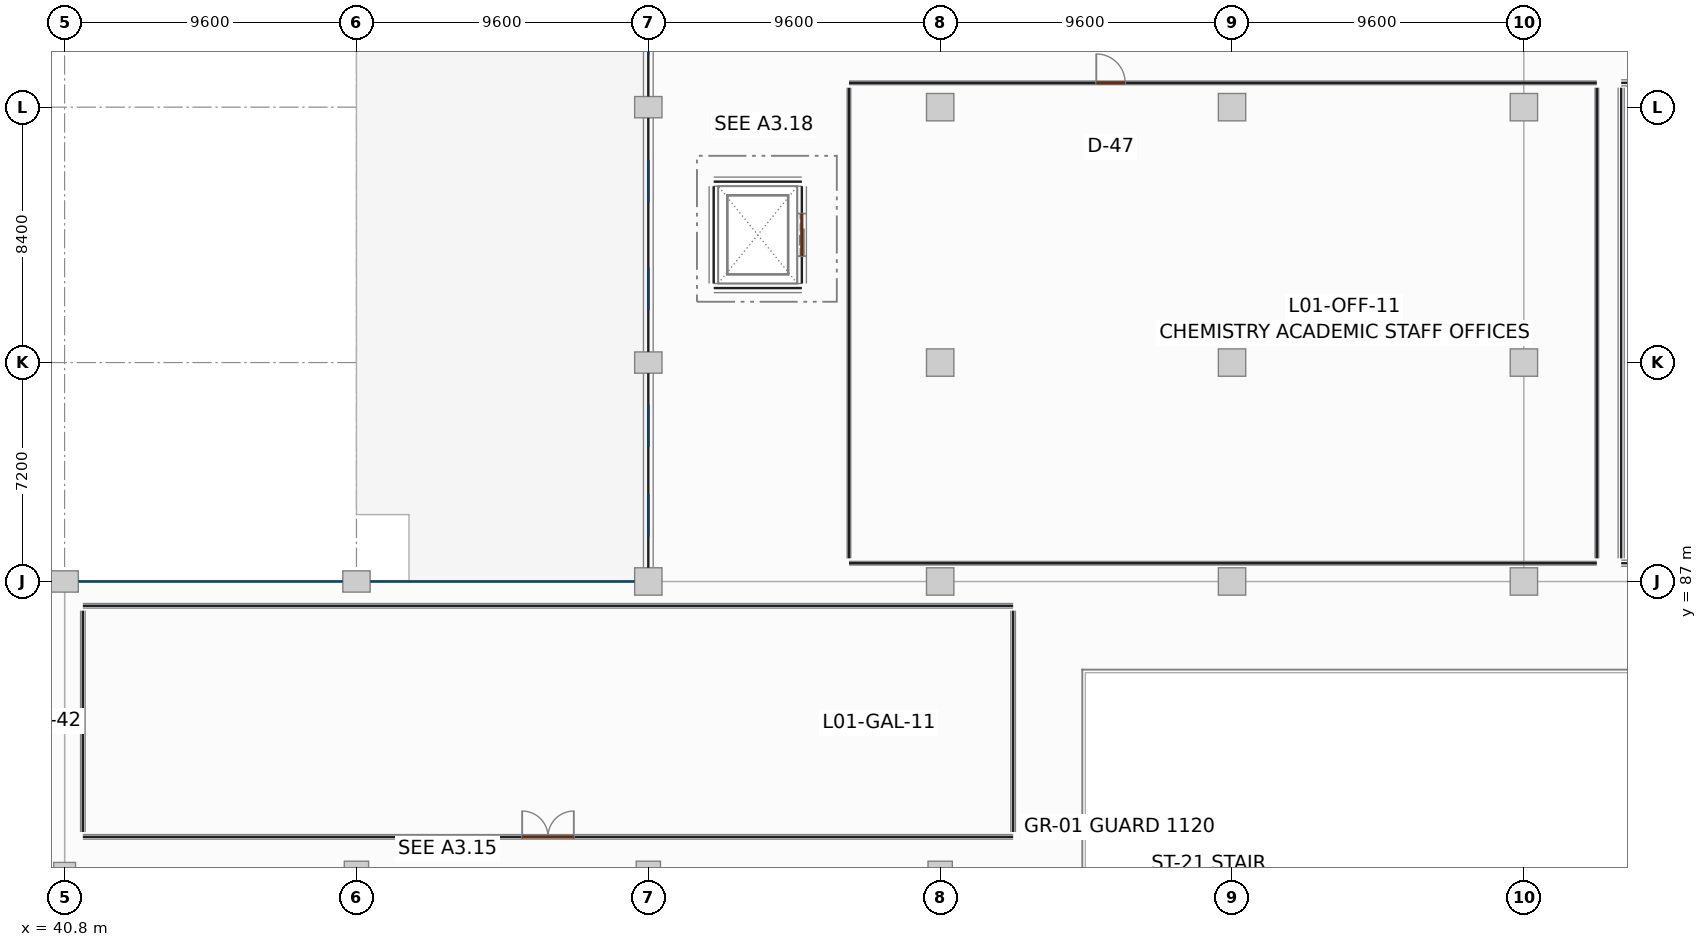
"""IFC4 building model, lengths in metres.
Left out: names, types, materials, properties, quantities, classifications, styles, units other than length and angle.
Written with IfcOpenShell. Run it as: python <this file> out.ifc"""

import sys

from ifc_helpers import new_model, si_unit, direction, frame, frame_2d, origin, origin_2d, place, context, subcontext, project, spatial, rectangle, extrude, element, fill, save


model = new_model("IFC4")
c1 = context("Model", 3, precision=1e-05, world=origin(), true_north=direction((0.0, 1.0)))
c2 = subcontext(c1, "Body", "Model", "MODEL_VIEW")
j1 = project(units=[si_unit("LENGTHUNIT", "METRE"), si_unit("PLANEANGLEUNIT", "RADIAN")], contexts=[c1])
p1 = place(None, origin())
s1 = spatial("IfcSite", under=j1, at=p1, CompositionType="ELEMENT")
p2 = place(p1, origin())
s2 = spatial("IfcBuilding", under=s1, at=p2, CompositionType="ELEMENT")
p3 = place(p2, frame((0.0, 0.0, 5.4)))
s3 = spatial("IfcBuildingStorey", under=s2, at=p3, CompositionType="ELEMENT", Elevation=5.4)
p4 = place(p3, frame((40.8, 77.4, 0.0), z_axis=(0.0, 0.0, 1.0), x_axis=(1.0, 0.0, 0.0)))
e1 = element("IfcColumn", 1, at=p4, inside=s3, PredefinedType="COLUMN", context=c2, shape_type="SweptSolid", body=[
    extrude(rectangle(XDim=0.72, YDim=0.72, at=origin_2d()), origin(), (0.0, 0.0, 1.0), 4.18),
])
p5 = place(p3, frame((40.8, 87.0, 0.0), z_axis=(0.0, 0.0, 1.0), x_axis=(1.0, 0.0, 0.0)))
e2 = element("IfcColumn", 2, at=p5, inside=s3, PredefinedType="COLUMN", context=c2, shape_type="SweptSolid", body=[
    extrude(rectangle(XDim=0.9, YDim=0.7, at=origin_2d()), origin(), (0.0, 0.0, 1.0), 4.18),
])
p6 = place(p3, frame((50.4, 77.4, 0.0), z_axis=(0.0, 0.0, 1.0), x_axis=(1.0, 0.0, 0.0)))
e3 = element("IfcColumn", 3, at=p6, inside=s3, PredefinedType="COLUMN", context=c2, shape_type="SweptSolid", body=[
    extrude(rectangle(XDim=0.8, YDim=0.8, at=origin_2d()), origin(), (0.0, 0.0, 1.0), 4.18),
])
p7 = place(p3, frame((50.4, 87.0, 0.0), z_axis=(0.0, 0.0, 1.0), x_axis=(1.0, 0.0, 0.0)))
e4 = element("IfcColumn", 4, at=p7, inside=s3, PredefinedType="COLUMN", context=c2, shape_type="SweptSolid", body=[
    extrude(rectangle(XDim=0.9, YDim=0.7, at=origin_2d()), origin(), (0.0, 0.0, 1.0), 4.18),
])
p8 = place(p3, frame((60.0, 77.4, 0.0), z_axis=(0.0, 0.0, 1.0), x_axis=(1.0, 0.0, 0.0)))
e5 = element("IfcColumn", 5, at=p8, inside=s3, PredefinedType="COLUMN", context=c2, shape_type="SweptSolid", body=[
    extrude(rectangle(XDim=0.8, YDim=0.8, at=origin_2d()), origin(), (0.0, 0.0, 1.0), 4.18),
])
p9 = place(p3, frame((60.0, 87.0, 0.0), z_axis=(0.0, 0.0, 1.0), x_axis=(1.0, 0.0, 0.0)))
e6 = element("IfcColumn", 6, at=p9, inside=s3, PredefinedType="COLUMN", context=c2, shape_type="SweptSolid", body=[
    extrude(rectangle(XDim=0.9, YDim=0.9, at=origin_2d()), origin(), (0.0, 0.0, 1.0), 4.18),
])
for number, where, z_axis, x_axis in (
    (7, (60.0, 94.2, 0.0), (0.0, 0.0, 1.0), (1.0, 0.0, 0.0)),
    (8, (60.0, 102.6, 0.0), (0.0, 0.0, 1.0), (1.0, 0.0, 0.0)),
):
    element("IfcColumn", number, at=place(p3, frame(where, z_axis=z_axis, x_axis=x_axis)), inside=s3, PredefinedType="COLUMN", context=c2, shape_type="SweptSolid", body=[
        extrude(rectangle(XDim=0.9, YDim=0.7, at=origin_2d()), origin(), (0.0, 0.0, 1.0), 4.18),
    ])
p10 = place(p3, frame((69.6, 77.4, 0.0), z_axis=(0.0, 0.0, 1.0), x_axis=(1.0, 0.0, 0.0)))
e9 = element("IfcColumn", 9, at=p10, inside=s3, PredefinedType="COLUMN", context=c2, shape_type="SweptSolid", body=[
    extrude(rectangle(XDim=0.8, YDim=0.8, at=origin_2d()), origin(), (0.0, 0.0, 1.0), 4.18),
])
for number, where, z_axis, x_axis in (
    (10, (69.6, 87.0, 0.0), (0.0, 0.0, 1.0), (1.0, 0.0, 0.0)),
    (11, (69.6, 94.2, 0.0), (0.0, 0.0, 1.0), (1.0, 0.0, 0.0)),
    (12, (69.6, 102.6, 0.0), (0.0, 0.0, 1.0), (1.0, 0.0, 0.0)),
    (13, (79.2, 87.0, 0.0), (0.0, 0.0, 1.0), (1.0, 0.0, 0.0)),
    (14, (79.2, 94.2, 0.0), (0.0, 0.0, 1.0), (1.0, 0.0, 0.0)),
    (15, (79.2, 102.6, 0.0), (0.0, 0.0, 1.0), (1.0, 0.0, 0.0)),
    (16, (88.8, 87.0, 0.0), (0.0, 0.0, 1.0), (1.0, 0.0, 0.0)),
    (17, (88.8, 94.2, 0.0), (0.0, 0.0, 1.0), (1.0, 0.0, 0.0)),
    (18, (88.8, 102.6, 0.0), (0.0, 0.0, 1.0), (1.0, 0.0, 0.0)),
):
    element("IfcColumn", number, at=place(p3, frame(where, z_axis=z_axis, x_axis=x_axis)), inside=s3, PredefinedType="COLUMN", context=c2, shape_type="SweptSolid", body=[
        extrude(rectangle(XDim=0.9, YDim=0.9, at=origin_2d()), origin(), (0.0, 0.0, 1.0), 4.18),
    ])
p11 = place(p3, frame((60.0, 87.452, 0.0), z_axis=(0.0, 0.0, 1.0), x_axis=(0.0, 1.0, 0.0)))
e19 = element("IfcWall", 19, at=p11, inside=s3, PredefinedType="SOLIDWALL", context=c2, shape_type="SweptSolid", body=[
    extrude(rectangle(XDim=6.396, YDim=0.32, at=frame_2d((3.198, 0.0))), origin(), (0.0, 0.0, 1.0), 3.38),
])
p12 = place(p11, frame((1.027, 0.0, 0.85)))
e20 = element("IfcOpeningElement", 20, at=p12, cuts=e19, PredefinedType="OPENING", context=c2, shape_type="SweptSolid", body=[
    extrude(rectangle(XDim=1.4, YDim=1.65, at=frame_2d((0.7, 0.825))), frame((0.0, 0.17, 0.0), z_axis=(0.0, -1.0, 0.0), x_axis=(1.0, 0.0, 0.0)), (0.0, 0.0, 1.0), 0.34),
])
p13 = place(p11, frame((3.969, 0.0, 0.85)))
e21 = element("IfcOpeningElement", 21, at=p13, cuts=e19, PredefinedType="OPENING", context=c2, shape_type="SweptSolid", body=[
    extrude(rectangle(XDim=1.4, YDim=1.65, at=frame_2d((0.7, 0.825))), frame((0.0, 0.17, 0.0), z_axis=(0.0, -1.0, 0.0), x_axis=(1.0, 0.0, 0.0)), (0.0, 0.0, 1.0), 0.34),
])
p14 = place(p3, frame((60.0, 94.552, 0.0), z_axis=(0.0, 0.0, 1.0), x_axis=(0.0, 1.0, 0.0)))
e22 = element("IfcWall", 22, at=p14, inside=s3, PredefinedType="SOLIDWALL", context=c2, shape_type="SweptSolid", body=[
    extrude(rectangle(XDim=7.696, YDim=0.32, at=frame_2d((3.848, 0.0))), origin(), (0.0, 0.0, 1.0), 3.38),
])
p15 = place(p14, frame((1.378, 0.0, 0.85)))
e23 = element("IfcOpeningElement", 23, at=p15, cuts=e22, PredefinedType="OPENING", context=c2, shape_type="SweptSolid", body=[
    extrude(rectangle(XDim=1.4, YDim=1.65, at=frame_2d((0.7, 0.825))), frame((0.0, 0.17, 0.0), z_axis=(0.0, -1.0, 0.0), x_axis=(1.0, 0.0, 0.0)), (0.0, 0.0, 1.0), 0.34),
])
p16 = place(p14, frame((4.918, 0.0, 0.85)))
e24 = element("IfcOpeningElement", 24, at=p16, cuts=e22, PredefinedType="OPENING", context=c2, shape_type="SweptSolid", body=[
    extrude(rectangle(XDim=1.4, YDim=1.65, at=frame_2d((0.7, 0.825))), frame((0.0, 0.17, 0.0), z_axis=(0.0, -1.0, 0.0), x_axis=(1.0, 0.0, 0.0)), (0.0, 0.0, 1.0), 0.34),
])
p17 = place(p3, frame((60.0, 102.952, 0.0), z_axis=(0.0, 0.0, 1.0), x_axis=(0.0, 1.0, 0.0)))
e25 = element("IfcWall", 25, at=p17, inside=s3, PredefinedType="SOLIDWALL", context=c2, shape_type="SweptSolid", body=[
    extrude(rectangle(XDim=7.696, YDim=0.32, at=frame_2d((3.848, 0.0))), origin(), (0.0, 0.0, 1.0), 3.38),
])
p18 = place(p17, frame((1.378, 0.0, 0.85)))
e26 = element("IfcOpeningElement", 26, at=p18, cuts=e25, PredefinedType="OPENING", context=c2, shape_type="SweptSolid", body=[
    extrude(rectangle(XDim=1.4, YDim=1.65, at=frame_2d((0.7, 0.825))), frame((0.0, 0.17, 0.0), z_axis=(0.0, -1.0, 0.0), x_axis=(1.0, 0.0, 0.0)), (0.0, 0.0, 1.0), 0.34),
])
p19 = place(p17, frame((4.918, 0.0, 0.85)))
e27 = element("IfcOpeningElement", 27, at=p19, cuts=e25, PredefinedType="OPENING", context=c2, shape_type="SweptSolid", body=[
    extrude(rectangle(XDim=1.4, YDim=1.65, at=frame_2d((0.7, 0.825))), frame((0.0, 0.17, 0.0), z_axis=(0.0, -1.0, 0.0), x_axis=(1.0, 0.0, 0.0)), (0.0, 0.0, 1.0), 0.34),
])
for number, where, z_axis, x_axis in (
    (28, (62.15, 96.65, 0.0), (0.0, 0.0, 1.0), (1.0, 0.0, 0.0)),
    (29, (62.15, 100.15, 0.0), (0.0, 0.0, 1.0), (1.0, 0.0, 0.0)),
):
    element("IfcWall", number, at=place(p3, frame(where, z_axis=z_axis, x_axis=x_axis)), inside=s3, PredefinedType="SHEAR", context=c2, shape_type="SweptSolid", body=[
        extrude(rectangle(XDim=2.9, YDim=0.3, at=frame_2d((1.45, 0.0))), origin(), (0.0, 0.0, 1.0), 4.18),
    ])
p20 = place(p3, frame((62.15, 96.8, 0.0), z_axis=(0.0, 0.0, 1.0), x_axis=(0.0, 1.0, 0.0)))
e30 = element("IfcWall", 30, at=p20, inside=s3, PredefinedType="SHEAR", context=c2, shape_type="SweptSolid", body=[
    extrude(rectangle(XDim=3.2, YDim=0.3, at=frame_2d((1.6, 0.0))), origin(), (0.0, 0.0, 1.0), 4.18),
])
p21 = place(p3, frame((65.05, 96.8, 0.0), z_axis=(0.0, 0.0, 1.0), x_axis=(0.0, 1.0, 0.0)))
e31 = element("IfcWall", 31, at=p21, inside=s3, PredefinedType="SHEAR", context=c2, shape_type="SweptSolid", body=[
    extrude(rectangle(XDim=3.2, YDim=0.3, at=frame_2d((1.6, 0.0))), origin(), (0.0, 0.0, 1.0), 4.18),
])
p22 = place(p21, frame((0.9, 0.0, 0.0)))
e32 = element("IfcOpeningElement", 32, at=p22, cuts=e31, PredefinedType="OPENING", context=c2, shape_type="SweptSolid", body=[
    extrude(rectangle(XDim=1.4, YDim=2.3, at=frame_2d((0.7, 1.15))), frame((0.0, 0.16, 0.0), z_axis=(0.0, -1.0, 0.0), x_axis=(1.0, 0.0, 0.0)), (0.0, 0.0, 1.0), 0.32),
])
p23 = place(p3, frame((41.4, 78.6, 0.0), z_axis=(0.0, 0.0, 1.0), x_axis=(1.0, 0.0, 0.0)))
e33 = element("IfcWall", 33, at=p23, inside=s3, PredefinedType="PARTITIONING", context=c2, shape_type="SweptSolid", body=[
    extrude(rectangle(XDim=30.6, YDim=0.15, at=frame_2d((15.3, 0.0))), origin(), (0.0, 0.0, 1.0), 3.22),
])
p24 = place(p23, frame((14.45, 0.0, 0.0)))
e34 = element("IfcOpeningElement", 34, at=p24, cuts=e33, PredefinedType="OPENING", context=c2, shape_type="SweptSolid", body=[
    extrude(rectangle(XDim=1.7, YDim=2.3, at=frame_2d((0.85, 1.15))), frame((0.0, 0.085, 0.0), z_axis=(0.0, -1.0, 0.0), x_axis=(1.0, 0.0, 0.0)), (0.0, 0.0, 1.0), 0.17),
])
p25 = place(p3, frame((41.4, 86.2, 0.0), z_axis=(0.0, 0.0, 1.0), x_axis=(1.0, 0.0, 0.0)))
e35 = element("IfcWall", 35, at=p25, inside=s3, PredefinedType="PARTITIONING", context=c2, shape_type="SweptSolid", body=[
    extrude(rectangle(XDim=30.6, YDim=0.15, at=frame_2d((15.3, 0.0))), origin(), (0.0, 0.0, 1.0), 3.22),
])
for number, where, z_axis, x_axis in (
    (36, (41.4, 78.76, 0.0), (0.0, 0.0, 1.0), (0.0, 1.0, 0.0)),
    (37, (72.0, 78.76, 0.0), (0.0, 0.0, 1.0), (0.0, 1.0, 0.0)),
):
    element("IfcWall", number, at=place(p3, frame(where, z_axis=z_axis, x_axis=x_axis)), inside=s3, PredefinedType="PARTITIONING", context=c2, shape_type="SweptSolid", body=[
        extrude(rectangle(XDim=7.28, YDim=0.15, at=frame_2d((3.64, 0.0))), origin(), (0.0, 0.0, 1.0), 3.22),
    ])
p26 = place(p3, frame((66.6, 87.6, 0.0), z_axis=(0.0, 0.0, 1.0), x_axis=(1.0, 0.0, 0.0)))
e38 = element("IfcWall", 38, at=p26, inside=s3, PredefinedType="PARTITIONING", context=c2, shape_type="SweptSolid", body=[
    extrude(rectangle(XDim=24.6, YDim=0.12, at=frame_2d((12.3, 0.0))), origin(), (0.0, 0.0, 1.0), 3.22),
])
p27 = place(p3, frame((66.6, 103.4, 0.0), z_axis=(0.0, 0.0, 1.0), x_axis=(1.0, 0.0, 0.0)))
e39 = element("IfcWall", 39, at=p27, inside=s3, PredefinedType="PARTITIONING", context=c2, shape_type="SweptSolid", body=[
    extrude(rectangle(XDim=24.6, YDim=0.12, at=frame_2d((12.3, 0.0))), origin(), (0.0, 0.0, 1.0), 3.22),
])
p28 = place(p27, frame((8.135, 0.0, 0.0)))
e40 = element("IfcOpeningElement", 40, at=p28, cuts=e39, PredefinedType="OPENING", context=c2, shape_type="SweptSolid", body=[
    extrude(rectangle(XDim=0.95, YDim=2.15, at=frame_2d((0.475, 1.075))), frame((0.0, 0.07, 0.0), z_axis=(0.0, -1.0, 0.0), x_axis=(1.0, 0.0, 0.0)), (0.0, 0.0, 1.0), 0.14),
])
for number, where, z_axis, x_axis in (
    (41, (66.6, 87.76, 0.0), (0.0, 0.0, 1.0), (0.0, 1.0, 0.0)),
    (42, (91.2, 87.76, 0.0), (0.0, 0.0, 1.0), (0.0, 1.0, 0.0)),
):
    element("IfcWall", number, at=place(p3, frame(where, z_axis=z_axis, x_axis=x_axis)), inside=s3, PredefinedType="PARTITIONING", context=c2, shape_type="SweptSolid", body=[
        extrude(rectangle(XDim=15.48, YDim=0.12, at=frame_2d((7.74, 0.0))), origin(), (0.0, 0.0, 1.0), 3.22),
    ])
p29 = place(p3, frame((92.0, 87.6, 0.0), z_axis=(0.0, 0.0, 1.0), x_axis=(1.0, 0.0, 0.0)))
e43 = element("IfcWall", 43, at=p29, inside=s3, PredefinedType="PARTITIONING", context=c2, shape_type="SweptSolid", body=[
    extrude(rectangle(XDim=24.8, YDim=0.2, at=frame_2d((12.4, 0.0))), origin(), (0.0, 0.0, 1.0), 3.22),
])
p30 = place(p3, frame((92.0, 103.4, 0.0), z_axis=(0.0, 0.0, 1.0), x_axis=(1.0, 0.0, 0.0)))
e44 = element("IfcWall", 44, at=p30, inside=s3, PredefinedType="PARTITIONING", context=c2, shape_type="SweptSolid", body=[
    extrude(rectangle(XDim=24.8, YDim=0.2, at=frame_2d((12.4, 0.0))), origin(), (0.0, 0.0, 1.0), 3.22),
])
p31 = place(p30, frame((11.65, 0.0, 0.0)))
e45 = element("IfcOpeningElement", 45, at=p31, cuts=e44, PredefinedType="OPENING", context=c2, shape_type="SweptSolid", body=[
    extrude(rectangle(XDim=1.5, YDim=2.2, at=frame_2d((0.75, 1.1))), frame((0.0, 0.11, 0.0), z_axis=(0.0, -1.0, 0.0), x_axis=(1.0, 0.0, 0.0)), (0.0, 0.0, 1.0), 0.22),
])
p32 = place(p3, frame((92.0, 87.76, 0.0), z_axis=(0.0, 0.0, 1.0), x_axis=(0.0, 1.0, 0.0)))
e46 = element("IfcWall", 46, at=p32, inside=s3, PredefinedType="PARTITIONING", context=c2, shape_type="SweptSolid", body=[
    extrude(rectangle(XDim=15.48, YDim=0.2, at=frame_2d((7.74, 0.0))), origin(), (0.0, 0.0, 1.0), 3.22),
])
p33 = place(p12, origin())
e47 = element("IfcWindow", 47, at=p33, inside=s3, PartitioningType="SINGLE_PANEL", PredefinedType="WINDOW", context=c2, shape_type="SweptSolid", body=[
    extrude(rectangle(XDim=1.4, YDim=1.65, at=frame_2d((0.7, 0.825))), frame((0.0, 0.03, 0.0), z_axis=(0.0, -1.0, 0.0), x_axis=(1.0, 0.0, 0.0)), (0.0, 0.0, 1.0), 0.06),
])
fill(e20, e47)
p34 = place(p13, origin())
e48 = element("IfcWindow", 48, at=p34, inside=s3, PartitioningType="SINGLE_PANEL", PredefinedType="WINDOW", context=c2, shape_type="SweptSolid", body=[
    extrude(rectangle(XDim=1.4, YDim=1.65, at=frame_2d((0.7, 0.825))), frame((0.0, 0.03, 0.0), z_axis=(0.0, -1.0, 0.0), x_axis=(1.0, 0.0, 0.0)), (0.0, 0.0, 1.0), 0.06),
])
fill(e21, e48)
p35 = place(p15, origin())
e49 = element("IfcWindow", 49, at=p35, inside=s3, PartitioningType="SINGLE_PANEL", PredefinedType="WINDOW", context=c2, shape_type="SweptSolid", body=[
    extrude(rectangle(XDim=1.4, YDim=1.65, at=frame_2d((0.7, 0.825))), frame((0.0, 0.03, 0.0), z_axis=(0.0, -1.0, 0.0), x_axis=(1.0, 0.0, 0.0)), (0.0, 0.0, 1.0), 0.06),
])
fill(e23, e49)
p36 = place(p16, origin())
e50 = element("IfcWindow", 50, at=p36, inside=s3, PartitioningType="SINGLE_PANEL", PredefinedType="WINDOW", context=c2, shape_type="SweptSolid", body=[
    extrude(rectangle(XDim=1.4, YDim=1.65, at=frame_2d((0.7, 0.825))), frame((0.0, 0.03, 0.0), z_axis=(0.0, -1.0, 0.0), x_axis=(1.0, 0.0, 0.0)), (0.0, 0.0, 1.0), 0.06),
])
fill(e24, e50)
p37 = place(p18, origin())
e51 = element("IfcWindow", 51, at=p37, inside=s3, PartitioningType="SINGLE_PANEL", PredefinedType="WINDOW", context=c2, shape_type="SweptSolid", body=[
    extrude(rectangle(XDim=1.4, YDim=1.65, at=frame_2d((0.7, 0.825))), frame((0.0, 0.03, 0.0), z_axis=(0.0, -1.0, 0.0), x_axis=(1.0, 0.0, 0.0)), (0.0, 0.0, 1.0), 0.06),
])
fill(e26, e51)
p38 = place(p22, origin())
e52 = element("IfcDoor", 52, at=p38, inside=s3, OperationType="SLIDING_TO_LEFT", PredefinedType="DOOR", context=c2, shape_type="SweptSolid", body=[
    extrude(rectangle(XDim=1.4, YDim=2.3, at=frame_2d((0.7, 1.15))), frame((0.0, 0.025, 0.0), z_axis=(0.0, -1.0, 0.0), x_axis=(1.0, 0.0, 0.0)), (0.0, 0.0, 1.0), 0.05),
])
fill(e32, e52)
p39 = place(p24, origin())
e53 = element("IfcDoor", 53, at=p39, inside=s3, OperationType="DOUBLE_DOOR_SINGLE_SWING", PredefinedType="DOOR", context=c2, shape_type="SweptSolid", body=[
    extrude(rectangle(XDim=1.7, YDim=2.3, at=frame_2d((0.85, 1.15))), frame((0.0, 0.025, 0.0), z_axis=(0.0, -1.0, 0.0), x_axis=(1.0, 0.0, 0.0)), (0.0, 0.0, 1.0), 0.05),
])
fill(e34, e53)
p40 = place(p28, origin())
e54 = element("IfcDoor", 54, at=p40, inside=s3, OperationType="SINGLE_SWING_LEFT", PredefinedType="DOOR", context=c2, shape_type="SweptSolid", body=[
    extrude(rectangle(XDim=0.95, YDim=2.15, at=frame_2d((0.475, 1.075))), frame((0.0, 0.025, 0.0), z_axis=(0.0, -1.0, 0.0), x_axis=(1.0, 0.0, 0.0)), (0.0, 0.0, 1.0), 0.05),
])
fill(e40, e54)
save(model, sys.argv[1])
